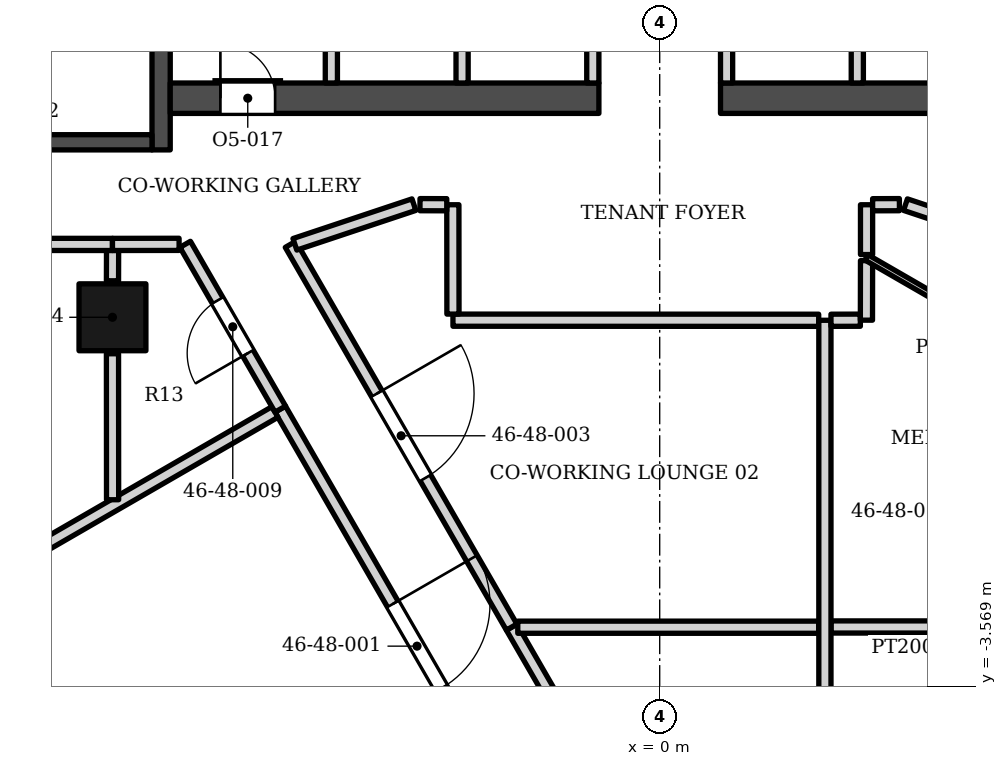
"""IFC4 building model, lengths in metres.
Left out: names, types, materials, properties, quantities, classifications, styles, units other than length and angle.
Written with IfcOpenShell. Run it as: python <this file> out.ifc"""

import sys

from ifc_helpers import new_model, si_unit, direction, frame, frame_2d, origin, origin_2d, place, context, subcontext, project, spatial, rectangle, extrude, element, fill, save


model = new_model("IFC4")
c1 = context("Model", 3, precision=1e-05, world=origin(), true_north=direction((0.0, 1.0)))
c2 = subcontext(c1, "Body", "Model", "MODEL_VIEW")
j1 = project(units=[si_unit("LENGTHUNIT", "METRE"), si_unit("PLANEANGLEUNIT", "RADIAN")], contexts=[c1])
p1 = place(None, origin())
s1 = spatial("IfcSite", under=j1, at=p1, CompositionType="ELEMENT")
p2 = place(p1, origin())
s2 = spatial("IfcBuilding", under=s1, at=p2, CompositionType="ELEMENT")
p3 = place(p2, frame((0.0, 0.0, 196.4)))
s3 = spatial("IfcBuildingStorey", under=s2, at=p3, CompositionType="ELEMENT", Elevation=196.4)
p4 = place(p3, frame((-8.2, 5.253, 0.0), z_axis=(0.0, 0.0, 1.0), x_axis=(0.0, 1.0, 0.0)))
e1 = element("IfcWall", 1, at=p4, inside=s3, PredefinedType="SHEAR", context=c2, shape_type="SweptSolid", body=[
    extrude(rectangle(XDim=13.3, YDim=0.3, at=frame_2d((6.65, 0.0))), origin(), (0.0, 0.0, 1.0), 3.9),
])
p5 = place(p4, frame((7.1, 0.0, 0.0)))
e2 = element("IfcOpeningElement", 2, at=p5, cuts=e1, PredefinedType="OPENING", context=c2, shape_type="SweptSolid", body=[
    extrude(rectangle(XDim=1.4, YDim=2.1, at=frame_2d((0.7, 1.05))), frame((0.0, 0.16, 0.0), z_axis=(0.0, -1.0, 0.0), x_axis=(1.0, 0.0, 0.0)), (0.0, 0.0, 1.0), 0.32),
])
p6 = place(p4, frame((5.05, 0.0, 0.0)))
e3 = element("IfcOpeningElement", 3, at=p6, cuts=e1, PredefinedType="OPENING", context=c2, shape_type="SweptSolid", body=[
    extrude(rectangle(XDim=1.4, YDim=2.1, at=frame_2d((0.7, 1.05))), frame((0.0, 0.16, 0.0), z_axis=(0.0, -1.0, 0.0), x_axis=(1.0, 0.0, 0.0)), (0.0, 0.0, 1.0), 0.32),
])
p7 = place(p3, frame((-12.1, 5.378, 0.0), z_axis=(0.0, 0.0, 1.0), x_axis=(1.0, 0.0, 0.0)))
e4 = element("IfcWall", 4, at=p7, inside=s3, PredefinedType="SHEAR", context=c2, shape_type="SweptSolid", body=[
    extrude(rectangle(XDim=3.75, YDim=0.25, at=frame_2d((1.875, 0.0))), origin(), (0.0, 0.0, 1.0), 3.9),
])
p8 = place(p3, frame((-8.05, 6.103, 0.0), z_axis=(0.0, 0.0, 1.0), x_axis=(1.0, 0.0, 0.0)))
e5 = element("IfcWall", 5, at=p8, inside=s3, PredefinedType="SHEAR", context=c2, shape_type="SweptSolid", body=[
    extrude(rectangle(XDim=7.05, YDim=0.5, at=frame_2d((3.525, 0.0))), origin(), (0.0, 0.0, 1.0), 3.9),
])
p9 = place(p8, frame((0.825, 0.0, 0.0)))
e6 = element("IfcOpeningElement", 6, at=p9, cuts=e5, PredefinedType="OPENING", context=c2, shape_type="SweptSolid", body=[
    extrude(rectangle(XDim=0.9, YDim=2.1, at=frame_2d((0.45, 1.05))), frame((0.0, 0.26, 0.0), z_axis=(0.0, -1.0, 0.0), x_axis=(1.0, 0.0, 0.0)), (0.0, 0.0, 1.0), 0.52),
])
p10 = place(p3, frame((1.0, 6.103, 0.0), z_axis=(0.0, 0.0, 1.0), x_axis=(1.0, 0.0, 0.0)))
e7 = element("IfcWall", 7, at=p10, inside=s3, PredefinedType="SHEAR", context=c2, shape_type="SweptSolid", body=[
    extrude(rectangle(XDim=7.05, YDim=0.5, at=frame_2d((3.525, 0.0))), origin(), (0.0, 0.0, 1.0), 3.9),
])
p11 = place(p10, frame((5.325, 0.0, 0.0)))
e8 = element("IfcOpeningElement", 8, at=p11, cuts=e7, PredefinedType="OPENING", context=c2, shape_type="SweptSolid", body=[
    extrude(rectangle(XDim=0.9, YDim=2.1, at=frame_2d((0.45, 1.05))), frame((0.0, 0.26, 0.0), z_axis=(0.0, -1.0, 0.0), x_axis=(1.0, 0.0, 0.0)), (0.0, 0.0, 1.0), 0.52),
])
p12 = place(p3, frame((-9.0, 2.5, 0.0), z_axis=(0.0, 0.0, 1.0), x_axis=(1.0, 0.0, 0.0)))
e9 = element("IfcColumn", 9, at=p12, inside=s3, PredefinedType="COLUMN", context=c2, shape_type="SweptSolid", body=[
    extrude(rectangle(XDim=1.1, YDim=1.1, at=origin_2d()), origin(), (0.0, 0.0, 1.0), 3.9),
])
for number, where, z_axis, x_axis in (
    (10, (-5.4, 6.353, 0.0), (0.0, 0.0, 1.0), (0.0, 1.0, 0.0)),
    (11, (-3.25, 6.353, 0.0), (0.0, 0.0, 1.0), (0.0, 1.0, 0.0)),
    (12, (-1.1, 6.353, 0.0), (0.0, 0.0, 1.0), (0.0, 1.0, 0.0)),
    (13, (1.1, 6.353, 0.0), (0.0, 0.0, 1.0), (0.0, 1.0, 0.0)),
    (14, (3.25, 6.353, 0.0), (0.0, 0.0, 1.0), (0.0, 1.0, 0.0)),
):
    element("IfcWall", number, at=place(p3, frame(where, z_axis=z_axis, x_axis=x_axis)), inside=s3, PredefinedType="SOLIDWALL", context=c2, shape_type="SweptSolid", body=[
        extrude(rectangle(XDim=2.5, YDim=0.2, at=frame_2d((1.25, 0.0))), origin(), (0.0, 0.0, 1.0), 3.73),
    ])
p13 = place(p3, frame((2.817, -10.473, 0.0), z_axis=(0.0, 0.0, 1.0), x_axis=(0.500185489254, 0.865918285024, 0.0)))
e15 = element("IfcWall", 15, at=p13, inside=s3, PredefinedType="PARTITIONING", context=c2, shape_type="SweptSolid", body=[
    extrude(rectangle(XDim=9.097, YDim=0.2, at=frame_2d((4.549, 0.0))), origin(), (0.0, 0.0, 1.0), 2.884),
])
p14 = place(p13, frame((3.995, 0.0, 0.0)))
e16 = element("IfcOpeningElement", 16, at=p14, cuts=e15, PredefinedType="OPENING", context=c2, shape_type="SweptSolid", body=[
    extrude(rectangle(XDim=0.9, YDim=2.1, at=frame_2d((0.45, 1.05))), frame((0.0, 0.11, 0.0), z_axis=(0.0, -1.0, 0.0), x_axis=(1.0, 0.0, 0.0)), (0.0, 0.0, 1.0), 0.22),
])
p15 = place(p3, frame((-6.241, 0.989, 0.0), z_axis=(0.0, 0.0, 1.0), x_axis=(0.5000018851, -0.866024315419, 0.0)))
e17 = element("IfcWall", 17, at=p15, inside=s3, PredefinedType="PARTITIONING", context=c2, shape_type="SweptSolid", body=[
    extrude(rectangle(XDim=9.0, YDim=0.2, at=frame_2d((4.5, 0.0))), origin(), (0.0, 0.0, 1.0), 2.884),
])
p16 = place(p15, frame((3.7, 0.0, 0.0)))
e18 = element("IfcOpeningElement", 18, at=p16, cuts=e17, PredefinedType="OPENING", context=c2, shape_type="SweptSolid", body=[
    extrude(rectangle(XDim=1.6, YDim=2.1, at=frame_2d((0.8, 1.05))), frame((0.0, 0.11, 0.0), z_axis=(0.0, -1.0, 0.0), x_axis=(1.0, 0.0, 0.0)), (0.0, 0.0, 1.0), 0.22),
])
p17 = place(p3, frame((-2.434, -2.597, 0.0), z_axis=(0.0, 0.0, 1.0), x_axis=(0.499860458914, -0.86610595288, 0.0)))
e19 = element("IfcWall", 19, at=p17, inside=s3, PredefinedType="PARTITIONING", context=c2, shape_type="SweptSolid", body=[
    extrude(rectangle(XDim=9.801, YDim=0.2, at=frame_2d((4.9, 0.0))), origin(), (0.0, 0.0, 1.0), 2.884),
])
p18 = place(p17, frame((4.449, 0.0, 0.0)))
e20 = element("IfcOpeningElement", 20, at=p18, cuts=e19, PredefinedType="OPENING", context=c2, shape_type="SweptSolid", body=[
    extrude(rectangle(XDim=0.9, YDim=2.1, at=frame_2d((0.45, 1.05))), frame((0.0, 0.11, 0.0), z_axis=(0.0, -1.0, 0.0), x_axis=(1.0, 0.0, 0.0)), (0.0, 0.0, 1.0), 0.22),
])
p19 = place(p3, frame((-2.334, -2.597, 0.0), z_axis=(0.0, 0.0, 1.0), x_axis=(1.0, 0.0, 0.0)))
e21 = element("IfcWall", 21, at=p19, inside=s3, PredefinedType="PARTITIONING", context=c2, shape_type="SweptSolid", body=[
    extrude(rectangle(XDim=4.949, YDim=0.2, at=frame_2d((2.475, 0.0))), origin(), (0.0, 0.0, 1.0), 2.884),
])
p20 = place(p3, frame((2.817, -2.593, 0.0), z_axis=(0.0, 0.0, 1.0), x_axis=(1.0, 0.0, 0.0)))
e22 = element("IfcWall", 22, at=p20, inside=s3, PredefinedType="PARTITIONING", context=c2, shape_type="SweptSolid", body=[
    extrude(rectangle(XDim=2.307, YDim=0.2, at=frame_2d((1.154, 0.0))), origin(), (0.0, 0.0, 1.0), 2.884),
])
p21 = place(p3, frame((-12.258, -2.485, 0.0), z_axis=(0.0, 0.0, 1.0), x_axis=(0.865815661702, 0.500363108105, 0.0)))
e23 = element("IfcWall", 23, at=p21, inside=s3, PredefinedType="PARTITIONING", context=c2, shape_type="SweptSolid", body=[
    extrude(rectangle(XDim=6.85, YDim=0.2, at=frame_2d((3.425, 0.0))), origin(), (0.0, 0.0, 1.0), 3.052),
])
p22 = place(p3, frame((-7.804, 3.699, 0.0), z_axis=(0.0, 0.0, 1.0), x_axis=(0.50003316619, -0.866006254429, 0.0)))
e24 = element("IfcWall", 24, at=p22, inside=s3, PredefinedType="PARTITIONING", context=c2, shape_type="SweptSolid", body=[
    extrude(rectangle(XDim=3.129, YDim=0.2, at=frame_2d((1.564, 0.0))), origin(), (0.0, 0.0, 1.0), 3.73),
])
p23 = place(p22, frame((1.065, 0.0, 0.0)))
e25 = element("IfcOpeningElement", 25, at=p23, cuts=e24, PredefinedType="OPENING", context=c2, shape_type="SweptSolid", body=[
    extrude(rectangle(XDim=1.0, YDim=2.1, at=frame_2d((0.5, 1.05))), frame((0.0, 0.11, 0.0), z_axis=(0.0, -1.0, 0.0), x_axis=(1.0, 0.0, 0.0)), (0.0, 0.0, 1.0), 0.22),
])
p24 = place(p3, frame((-9.0, 1.9, 0.0), z_axis=(0.0, 0.0, 1.0), x_axis=(0.000711888358, -0.999999746607, 0.0)))
e26 = element("IfcWall", 26, at=p24, inside=s3, PredefinedType="PARTITIONING", context=c2, shape_type="SweptSolid", body=[
    extrude(rectangle(XDim=2.401, YDim=0.2, at=frame_2d((1.2, 0.0))), origin(), (0.0, 0.0, 1.0), 3.052),
])
p25 = place(p3, frame((-3.4, 2.452, 0.0), z_axis=(0.0, 0.0, 1.0), x_axis=(0.99999995964, -0.000284113959, 0.0)))
e27 = element("IfcWall", 27, at=p25, inside=s3, PredefinedType="PARTITIONING", context=c2, shape_type="SweptSolid", body=[
    extrude(rectangle(XDim=6.015, YDim=0.2, at=frame_2d((3.008, 0.0))), origin(), (0.0, 0.0, 1.0), 3.73),
])
p26 = place(p3, frame((2.717, -10.646, 0.0), z_axis=(0.0, 0.0, 1.0), x_axis=(0.0, 1.0, 0.0)))
e28 = element("IfcWall", 28, at=p26, inside=s3, PredefinedType="PARTITIONING", context=c2, shape_type="SweptSolid", body=[
    extrude(rectangle(XDim=13.096, YDim=0.2, at=frame_2d((6.548, 0.0))), origin(), (0.0, 0.0, 1.0), 3.73),
])
p27 = place(p3, frame((2.817, 2.451, 0.0), z_axis=(0.0, 0.0, 1.0), x_axis=(0.999995404022, 0.003031820325, 0.0)))
e29 = element("IfcWall", 29, at=p27, inside=s3, PredefinedType="PARTITIONING", context=c2, shape_type="SweptSolid", body=[
    extrude(rectangle(XDim=0.483, YDim=0.2, at=frame_2d((0.242, 0.0))), origin(), (0.0, 0.0, 1.0), 3.73),
])
p28 = place(p3, frame((-3.402, 4.351, 0.0), z_axis=(0.0, 0.0, 1.0), x_axis=(0.001086217961, -0.999999410065, 0.0)))
e30 = element("IfcWall", 30, at=p28, inside=s3, PredefinedType="PARTITIONING", context=c2, shape_type="SweptSolid", body=[
    extrude(rectangle(XDim=1.798, YDim=0.2, at=frame_2d((0.899, 0.0))), origin(), (0.0, 0.0, 1.0), 3.73),
])
p29 = place(p3, frame((3.4, 2.452, 0.0), z_axis=(0.0, 0.0, 1.0), x_axis=(0.001995008499, 0.999998009969, 0.0)))
e31 = element("IfcWall", 31, at=p29, inside=s3, PredefinedType="PARTITIONING", context=c2, shape_type="SweptSolid", body=[
    extrude(rectangle(XDim=0.979, YDim=0.2, at=frame_2d((0.49, 0.0))), origin(), (0.0, 0.0, 1.0), 3.73),
])
p30 = place(p3, frame((3.4, 3.484, 0.0), z_axis=(0.0, 0.0, 1.0), x_axis=(0.866039077776, -0.499976315204, 0.0)))
e32 = element("IfcWall", 32, at=p30, inside=s3, PredefinedType="PARTITIONING", context=c2, shape_type="SweptSolid", body=[
    extrude(rectangle(XDim=4.523, YDim=0.1, at=frame_2d((2.262, 0.0))), origin(), (0.0, 0.0, 1.0), 2.884),
])
p31 = place(p3, frame((-9.0, 3.1, 0.0), z_axis=(0.0, 0.0, 1.0), x_axis=(0.00293253871, 0.999995700099, 0.0)))
e33 = element("IfcWall", 33, at=p31, inside=s3, PredefinedType="PARTITIONING", context=c2, shape_type="SweptSolid", body=[
    extrude(rectangle(XDim=0.5, YDim=0.2, at=frame_2d((0.25, 0.0))), origin(), (0.0, 0.0, 1.0), 3.332),
])
p32 = place(p3, frame((-14.4, 3.699, 0.0), z_axis=(0.0, 0.0, 1.0), x_axis=(0.999999963209, -0.000271259993, 0.0)))
e34 = element("IfcWall", 34, at=p32, inside=s3, PredefinedType="PARTITIONING", context=c2, shape_type="SweptSolid", body=[
    extrude(rectangle(XDim=5.4, YDim=0.2, at=frame_2d((2.7, 0.0))), origin(), (0.0, 0.0, 1.0), 3.73),
])
p33 = place(p32, frame((2.201, 0.0, 0.0)))
e35 = element("IfcOpeningElement", 35, at=p33, cuts=e34, PredefinedType="OPENING", context=c2, shape_type="SweptSolid", body=[
    extrude(rectangle(XDim=1.0, YDim=2.1, at=frame_2d((0.5, 1.05))), frame((0.0, 0.11, 0.0), z_axis=(0.0, -1.0, 0.0), x_axis=(1.0, 0.0, 0.0)), (0.0, 0.0, 1.0), 0.22),
])
p34 = place(p3, frame((-9.0, 3.698, 0.0), z_axis=(0.0, 0.0, 1.0), x_axis=(0.999999105954, 0.001337195149, 0.0)))
e36 = element("IfcWall", 36, at=p34, inside=s3, PredefinedType="PARTITIONING", context=c2, shape_type="SweptSolid", body=[
    extrude(rectangle(XDim=1.095, YDim=0.2, at=frame_2d((0.548, 0.0))), origin(), (0.0, 0.0, 1.0), 3.73),
])
p35 = place(p3, frame((-6.072, 3.7, 0.0), z_axis=(0.0, 0.0, 1.0), x_axis=(0.50020597598, -0.865906450833, 0.0)))
e37 = element("IfcWall", 37, at=p35, inside=s3, PredefinedType="PARTITIONING", context=c2, shape_type="SweptSolid", body=[
    extrude(rectangle(XDim=7.27, YDim=0.2, at=frame_2d((3.635, 0.0))), origin(), (0.0, 0.0, 1.0), 2.884),
])
p36 = place(p35, frame((2.836, 0.0, 0.0)))
e38 = element("IfcOpeningElement", 38, at=p36, cuts=e37, PredefinedType="OPENING", context=c2, shape_type="SweptSolid", body=[
    extrude(rectangle(XDim=1.6, YDim=2.1, at=frame_2d((0.8, 1.05))), frame((0.0, 0.11, 0.0), z_axis=(0.0, -1.0, 0.0), x_axis=(1.0, 0.0, 0.0)), (0.0, 0.0, 1.0), 0.22),
])
p37 = place(p3, frame((3.752, -11.861, 0.0), z_axis=(0.0, 0.0, 1.0), x_axis=(0.499914191036, 0.866074939945, 0.0)))
e39 = element("IfcWall", 39, at=p37, inside=s3, PredefinedType="PARTITIONING", context=c2, shape_type="SweptSolid", body=[
    extrude(rectangle(XDim=17.967, YDim=0.2, at=frame_2d((8.983, 0.0))), origin(), (0.0, 0.0, 1.0), 2.884),
])
p38 = place(p37, frame((8.083, 0.0, 0.0)))
e40 = element("IfcOpeningElement", 40, at=p38, cuts=e39, PredefinedType="OPENING", context=c2, shape_type="SweptSolid", body=[
    extrude(rectangle(XDim=1.8, YDim=2.4, at=frame_2d((0.9, 1.2))), frame((0.0, 0.11, 0.0), z_axis=(0.0, -1.0, 0.0), x_axis=(1.0, 0.0, 0.0)), (0.0, 0.0, 1.0), 0.22),
])
p39 = place(p3, frame((4.042, 4.352, 0.0), z_axis=(0.0, 0.0, 1.0), x_axis=(0.948695731075, -0.316190464499, 0.0)))
e41 = element("IfcWall", 41, at=p39, inside=s3, PredefinedType="PARTITIONING", context=c2, shape_type="SweptSolid", body=[
    extrude(rectangle(XDim=1.964, YDim=0.2, at=frame_2d((0.982, 0.0))), origin(), (0.0, 0.0, 1.0), 2.884),
])
p40 = place(p3, frame((-6.0, 3.7, 0.0), z_axis=(0.0, 0.0, 1.0), x_axis=(0.948683298051, 0.316227766017, 0.0)))
e42 = element("IfcWall", 42, at=p40, inside=s3, PredefinedType="PARTITIONING", context=c2, shape_type="SweptSolid", body=[
    extrude(rectangle(XDim=2.064, YDim=0.2, at=frame_2d((1.032, 0.0))), origin(), (0.0, 0.0, 1.0), 2.884),
])
p41 = place(p3, frame((-3.942, 4.352, 0.0), z_axis=(0.0, 0.0, 1.0), x_axis=(0.999996159087, -0.00277160798, 0.0)))
e43 = element("IfcWall", 43, at=p41, inside=s3, PredefinedType="PARTITIONING", context=c2, shape_type="SweptSolid", body=[
    extrude(rectangle(XDim=0.44, YDim=0.2, at=frame_2d((0.22, 0.0))), origin(), (0.0, 0.0, 1.0), 3.73),
])
p42 = place(p3, frame((3.402, 3.531, 0.0), z_axis=(0.0, 0.0, 1.0), x_axis=(0.0, 1.0, 0.0)))
e44 = element("IfcWall", 44, at=p42, inside=s3, PredefinedType="PARTITIONING", context=c2, shape_type="SweptSolid", body=[
    extrude(rectangle(XDim=0.819, YDim=0.2, at=frame_2d((0.41, 0.0))), origin(), (0.0, 0.0, 1.0), 3.73),
])
p43 = place(p3, frame((3.502, 4.351, 0.0), z_axis=(0.0, 0.0, 1.0), x_axis=(0.999996159087, 0.00277160798, 0.0)))
e45 = element("IfcWall", 45, at=p43, inside=s3, PredefinedType="PARTITIONING", context=c2, shape_type="SweptSolid", body=[
    extrude(rectangle(XDim=0.44, YDim=0.2, at=frame_2d((0.22, 0.0))), origin(), (0.0, 0.0, 1.0), 3.73),
])
p44 = place(p9, origin())
e46 = element("IfcDoor", 46, at=p44, inside=s3, OperationType="SINGLE_SWING_LEFT", PredefinedType="DOOR", context=c2, shape_type="SweptSolid", body=[
    extrude(rectangle(XDim=0.9, YDim=2.1, at=frame_2d((0.45, 1.05))), frame((0.0, 0.025, 0.0), z_axis=(0.0, -1.0, 0.0), x_axis=(1.0, 0.0, 0.0)), (0.0, 0.0, 1.0), 0.05),
])
fill(e6, e46)
p45 = place(p16, origin())
e47 = element("IfcDoor", 47, at=p45, inside=s3, OperationType="DOUBLE_DOOR_SINGLE_SWING", PredefinedType="DOOR", context=c2, shape_type="SweptSolid", body=[
    extrude(rectangle(XDim=1.6, YDim=2.1, at=frame_2d((0.8, 1.05))), frame((0.0, 0.025, 0.0), z_axis=(0.0, -1.0, 0.0), x_axis=(1.0, 0.0, 0.0)), (0.0, 0.0, 1.0), 0.05),
])
fill(e18, e47)
p46 = place(p36, origin())
e48 = element("IfcDoor", 48, at=p46, inside=s3, OperationType="DOUBLE_DOOR_SINGLE_SWING", PredefinedType="DOOR", context=c2, shape_type="SweptSolid", body=[
    extrude(rectangle(XDim=1.6, YDim=2.1, at=frame_2d((0.8, 1.05))), frame((0.0, 0.025, 0.0), z_axis=(0.0, -1.0, 0.0), x_axis=(1.0, 0.0, 0.0)), (0.0, 0.0, 1.0), 0.05),
])
fill(e38, e48)
p47 = place(p23, origin())
e49 = element("IfcDoor", 49, at=p47, inside=s3, OperationType="SINGLE_SWING_RIGHT", PredefinedType="DOOR", context=c2, shape_type="SweptSolid", body=[
    extrude(rectangle(XDim=1.0, YDim=2.1, at=frame_2d((0.5, 1.05))), frame((0.0, 0.025, 0.0), z_axis=(0.0, -1.0, 0.0), x_axis=(1.0, 0.0, 0.0)), (0.0, 0.0, 1.0), 0.05),
])
fill(e25, e49)
save(model, sys.argv[1])
